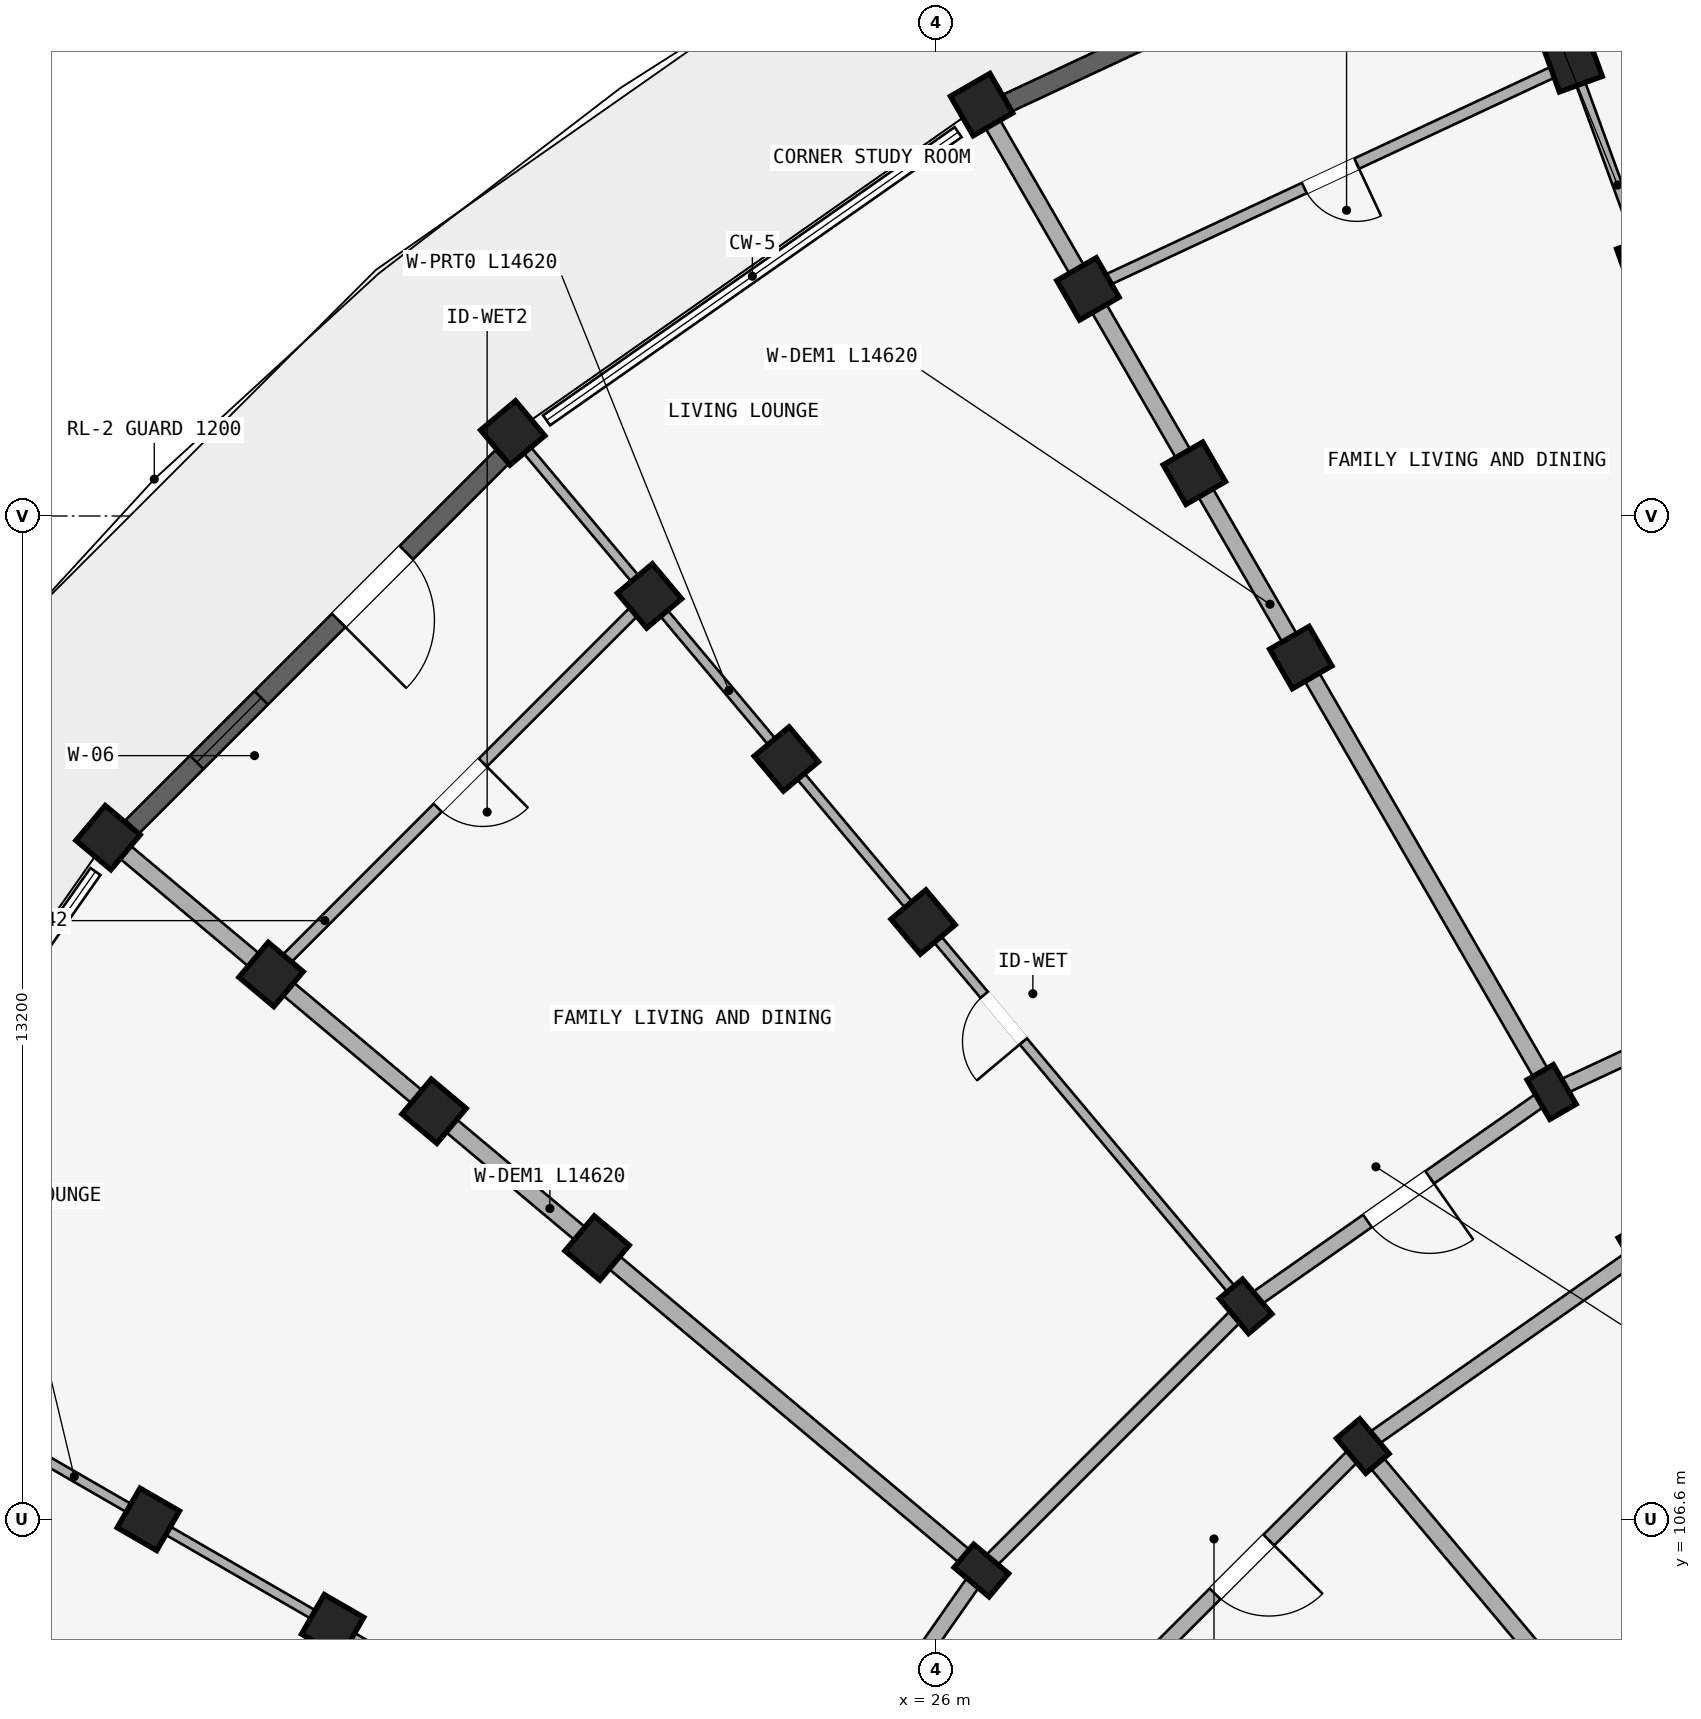
"""IFC4 building model, lengths in metres.
Left out: names, types, materials, properties, quantities, classifications, styles, units other than length and angle.
Written with IfcOpenShell. Run it as: python <this file> out.ifc"""

import sys

from ifc_helpers import new_model, si_unit, direction, frame, frame_2d, origin, origin_2d, place, context, subcontext, project, spatial, rectangle, extrude, element, fill, save


model = new_model("IFC4")
c1 = context("Model", 3, precision=1e-05, world=origin(), true_north=direction((0.0, 1.0)))
c2 = subcontext(c1, "Body", "Model", "MODEL_VIEW")
j1 = project(units=[si_unit("LENGTHUNIT", "METRE"), si_unit("PLANEANGLEUNIT", "RADIAN")], contexts=[c1])
p1 = place(None, origin())
s1 = spatial("IfcSite", under=j1, at=p1, CompositionType="ELEMENT")
p2 = place(p1, origin())
s2 = spatial("IfcBuilding", under=s1, at=p2, CompositionType="ELEMENT")
p3 = place(p2, frame((0.0, 0.0, 40.2)))
s3 = spatial("IfcBuildingStorey", under=s2, at=p3, CompositionType="ELEMENT", Elevation=40.2)
for number, where, z_axis, x_axis in (
    (1, (35.34, 123.132, 0.0), (0.0, 0.0, 1.0), (0.94, 0.342, 0.0)),
    (2, (34.382, 125.764, 0.0), (0.0, 0.0, 1.0), (0.94, 0.342, 0.0)),
):
    element("IfcColumn", number, at=place(p3, frame(where, z_axis=z_axis, x_axis=x_axis)), inside=s3, PredefinedType="COLUMN", context=c2, shape_type="SweptSolid", body=[
        extrude(rectangle(XDim=0.6, YDim=0.6, at=origin_2d()), origin(), (0.0, 0.0, 1.0), 2.93),
    ])
for number, where, z_axis, x_axis in (
    (3, (35.3, 110.144, 0.0), (0.0, 0.0, 1.0), (0.866, 0.5, 0.0)),
    (4, (34.1, 112.222, 0.0), (0.0, 0.0, 1.0), (0.866, 0.5, 0.0)),
):
    element("IfcColumn", number, at=place(p3, frame(where, z_axis=z_axis, x_axis=x_axis)), inside=s3, PredefinedType="COLUMN", context=c2, shape_type="SweptSolid", body=[
        extrude(rectangle(XDim=0.4, YDim=0.6, at=origin_2d()), origin(), (0.0, 0.0, 1.0), 2.93),
    ])
for number, where, z_axis, x_axis in (
    (5, (30.8, 117.938, 0.0), (0.0, 0.0, 1.0), (0.866, 0.5, 0.0)),
    (6, (29.4, 120.363, 0.0), (0.0, 0.0, 1.0), (0.866, 0.5, 0.0)),
    (7, (28.0, 122.787, 0.0), (0.0, 0.0, 1.0), (0.866, 0.5, 0.0)),
):
    element("IfcColumn", number, at=place(p3, frame(where, z_axis=z_axis, x_axis=x_axis)), inside=s3, PredefinedType="COLUMN", context=c2, shape_type="SweptSolid", body=[
        extrude(rectangle(XDim=0.6, YDim=0.6, at=origin_2d()), origin(), (0.0, 0.0, 1.0), 2.93),
    ])
p4 = place(p3, frame((26.6, 125.212, 0.0), z_axis=(0.0, 0.0, 1.0), x_axis=(0.866025403784, 0.5, 0.0)))
e8 = element("IfcColumn", 8, at=p4, inside=s3, PredefinedType="COLUMN", context=c2, shape_type="SweptSolid", body=[
    extrude(rectangle(XDim=0.6, YDim=0.6, at=origin_2d()), origin(), (0.0, 0.0, 1.0), 2.97),
])
for number, where, z_axis, x_axis in (
    (9, (31.616, 107.564, 0.0), (0.0, 0.0, 1.0), (0.766, 0.643, 0.0)),
    (10, (30.073, 109.402, 0.0), (0.0, 0.0, 1.0), (0.766, 0.643, 0.0)),
):
    element("IfcColumn", number, at=place(p3, frame(where, z_axis=z_axis, x_axis=x_axis)), inside=s3, PredefinedType="COLUMN", context=c2, shape_type="SweptSolid", body=[
        extrude(rectangle(XDim=0.4, YDim=0.6, at=origin_2d()), origin(), (0.0, 0.0, 1.0), 2.93),
    ])
for number, where, z_axis, x_axis in (
    (11, (25.831, 114.458, 0.0), (0.0, 0.0, 1.0), (0.766, 0.643, 0.0)),
    (12, (24.031, 116.603, 0.0), (0.0, 0.0, 1.0), (0.766, 0.643, 0.0)),
    (13, (22.231, 118.748, 0.0), (0.0, 0.0, 1.0), (0.766, 0.643, 0.0)),
):
    element("IfcColumn", number, at=place(p3, frame(where, z_axis=z_axis, x_axis=x_axis)), inside=s3, PredefinedType="COLUMN", context=c2, shape_type="SweptSolid", body=[
        extrude(rectangle(XDim=0.6, YDim=0.6, at=origin_2d()), origin(), (0.0, 0.0, 1.0), 2.93),
    ])
p5 = place(p3, frame((20.432, 120.893, 0.0), z_axis=(0.0, 0.0, 1.0), x_axis=(0.766044443119, 0.642787609687, 0.0)))
e14 = element("IfcColumn", 14, at=p5, inside=s3, PredefinedType="COLUMN", context=c2, shape_type="SweptSolid", body=[
    extrude(rectangle(XDim=0.6, YDim=0.6, at=origin_2d()), origin(), (0.0, 0.0, 1.0), 2.97),
])
p6 = place(p3, frame((26.598, 105.927, 0.0), z_axis=(0.0, 0.0, 1.0), x_axis=(0.642787609687, 0.766044443119, 0.0)))
e15 = element("IfcColumn", 15, at=p6, inside=s3, PredefinedType="COLUMN", context=c2, shape_type="SweptSolid", body=[
    extrude(rectangle(XDim=0.4, YDim=0.6, at=origin_2d()), origin(), (0.0, 0.0, 1.0), 2.93),
])
for number, where, z_axis, x_axis in (
    (16, (21.542, 110.169, 0.0), (0.0, 0.0, 1.0), (0.643, 0.766, 0.0)),
    (17, (19.397, 111.969, 0.0), (0.0, 0.0, 1.0), (0.643, 0.766, 0.0)),
    (18, (17.252, 113.769, 0.0), (0.0, 0.0, 1.0), (0.643, 0.766, 0.0)),
):
    element("IfcColumn", number, at=place(p3, frame(where, z_axis=z_axis, x_axis=x_axis)), inside=s3, PredefinedType="COLUMN", context=c2, shape_type="SweptSolid", body=[
        extrude(rectangle(XDim=0.6, YDim=0.6, at=origin_2d()), origin(), (0.0, 0.0, 1.0), 2.93),
    ])
p7 = place(p3, frame((15.107, 115.568, 0.0), z_axis=(0.0, 0.0, 1.0), x_axis=(0.642787609687, 0.766044443119, 0.0)))
e19 = element("IfcColumn", 19, at=p7, inside=s3, PredefinedType="COLUMN", context=c2, shape_type="SweptSolid", body=[
    extrude(rectangle(XDim=0.6, YDim=0.6, at=origin_2d()), origin(), (0.0, 0.0, 1.0), 2.97),
])
for number, where, z_axis, x_axis in (
    (20, (18.062, 105.2, 0.0), (0.0, 0.0, 1.0), (0.5, 0.866, 0.0)),
    (21, (15.637, 106.6, 0.0), (0.0, 0.0, 1.0), (0.5, 0.866, 0.0)),
):
    element("IfcColumn", number, at=place(p3, frame(where, z_axis=z_axis, x_axis=x_axis)), inside=s3, PredefinedType="COLUMN", context=c2, shape_type="SweptSolid", body=[
        extrude(rectangle(XDim=0.6, YDim=0.6, at=origin_2d()), origin(), (0.0, 0.0, 1.0), 2.93),
    ])
p8 = place(p3, frame((38.555, 114.299, 0.0), z_axis=(0.0, 0.0, 1.0), x_axis=(-0.906302381024, -0.422629854778, 0.0)))
e22 = element("IfcWall", 22, at=p8, inside=s3, PredefinedType="STANDARD", context=c2, shape_type="SweptSolid", body=[
    extrude(rectangle(XDim=4.915, YDim=0.2, at=frame_2d((2.458, 0.0))), origin(), (0.0, 0.0, 1.0), 2.372),
])
p9 = place(p3, frame((35.3, 110.144, 0.0), z_axis=(0.0, 0.0, 1.0), x_axis=(-0.819155404658, -0.573571637217, 0.0)))
e23 = element("IfcWall", 23, at=p9, inside=s3, PredefinedType="STANDARD", context=c2, shape_type="SweptSolid", body=[
    extrude(rectangle(XDim=4.497, YDim=0.2, at=frame_2d((2.249, 0.0))), origin(), (0.0, 0.0, 1.0), 2.372),
])
p10 = place(p3, frame((34.1, 112.222, 0.0), z_axis=(0.0, 0.0, 1.0), x_axis=(-0.819140911474, -0.573592335331, 0.0)))
e24 = element("IfcWall", 24, at=p10, inside=s3, PredefinedType="STANDARD", context=c2, shape_type="SweptSolid", body=[
    extrude(rectangle(XDim=4.916, YDim=0.2, at=frame_2d((2.458, 0.0))), origin(), (0.0, 0.0, 1.0), 2.372),
])
p11 = place(p10, frame((1.958, 0.0, 0.0)))
e25 = element("IfcOpeningElement", 25, at=p11, cuts=e24, PredefinedType="OPENING", context=c2, shape_type="SweptSolid", body=[
    extrude(rectangle(XDim=1.0, YDim=2.15, at=frame_2d((0.5, 1.075))), frame((0.0, 0.11, 0.0), z_axis=(0.0, -1.0, 0.0), x_axis=(1.0, 0.0, 0.0)), (0.0, 0.0, 1.0), 0.22),
])
p12 = place(p3, frame((31.616, 107.564, 0.0), z_axis=(0.0, 0.0, 1.0), x_axis=(-0.707106781187, -0.707106781187, 0.0)))
e26 = element("IfcWall", 26, at=p12, inside=s3, PredefinedType="STANDARD", context=c2, shape_type="SweptSolid", body=[
    extrude(rectangle(XDim=4.497, YDim=0.2, at=frame_2d((2.249, 0.0))), origin(), (0.0, 0.0, 1.0), 2.372),
])
p13 = place(p12, frame((1.749, 0.0, 0.0)))
e27 = element("IfcOpeningElement", 27, at=p13, cuts=e26, PredefinedType="OPENING", context=c2, shape_type="SweptSolid", body=[
    extrude(rectangle(XDim=1.0, YDim=2.15, at=frame_2d((0.5, 1.075))), frame((0.0, 0.11, 0.0), z_axis=(0.0, -1.0, 0.0), x_axis=(1.0, 0.0, 0.0)), (0.0, 0.0, 1.0), 0.22),
])
p14 = place(p3, frame((30.073, 109.402, 0.0), z_axis=(0.0, 0.0, 1.0), x_axis=(-0.707106781187, -0.707106781187, 0.0)))
e28 = element("IfcWall", 28, at=p14, inside=s3, PredefinedType="STANDARD", context=c2, shape_type="SweptSolid", body=[
    extrude(rectangle(XDim=4.916, YDim=0.2, at=frame_2d((2.458, 0.0))), origin(), (0.0, 0.0, 1.0), 2.372),
])
p15 = place(p3, frame((26.598, 105.927, 0.0), z_axis=(0.0, 0.0, 1.0), x_axis=(-0.573592335331, -0.819140911474, 0.0)))
e29 = element("IfcWall", 29, at=p15, inside=s3, PredefinedType="STANDARD", context=c2, shape_type="SweptSolid", body=[
    extrude(rectangle(XDim=4.916, YDim=0.2, at=frame_2d((2.458, 0.0))), origin(), (0.0, 0.0, 1.0), 2.372),
])
p16 = place(p15, frame((1.938, 0.0, 0.0)))
e30 = element("IfcOpeningElement", 30, at=p16, cuts=e29, PredefinedType="OPENING", context=c2, shape_type="SweptSolid", body=[
    extrude(rectangle(XDim=1.04, YDim=2.15, at=frame_2d((0.52, 1.075))), frame((0.0, 0.11, 0.0), z_axis=(0.0, -1.0, 0.0), x_axis=(1.0, 0.0, 0.0)), (0.0, 0.0, 1.0), 0.22),
])
p17 = place(p3, frame((38.521, 114.393, 0.0), z_axis=(0.0, 0.0, 1.0), x_axis=(-0.342015232663, 0.939694408106, 0.0)))
e31 = element("IfcWall", 31, at=p17, inside=s3, PredefinedType="PARTITIONING", context=c2, shape_type="SweptSolid", body=[
    extrude(rectangle(XDim=14.62, YDim=0.125, at=frame_2d((7.31, 0.0))), origin(), (0.0, 0.0, 1.0), 2.372),
])
p18 = place(p17, frame((4.449, 0.0, 0.0)))
e32 = element("IfcOpeningElement", 32, at=p18, cuts=e31, PredefinedType="OPENING", context=c2, shape_type="SweptSolid", body=[
    extrude(rectangle(XDim=0.8, YDim=2.1, at=frame_2d((0.4, 1.05))), frame((0.0, 0.073, 0.0), z_axis=(0.0, -1.0, 0.0), x_axis=(1.0, 0.0, 0.0)), (0.0, 0.0, 1.0), 0.145),
])
p19 = place(p3, frame((34.05, 112.309, 0.0), z_axis=(0.0, 0.0, 1.0), x_axis=(-0.500007702989, 0.866020956416, 0.0)))
e33 = element("IfcWall", 33, at=p19, inside=s3, PredefinedType="STANDARD", context=c2, shape_type="SweptSolid", body=[
    extrude(rectangle(XDim=14.62, YDim=0.22, at=frame_2d((7.31, 0.0))), origin(), (0.0, 0.0, 1.0), 2.372),
])
p20 = place(p3, frame((35.987, 102.355, 0.0), z_axis=(0.0, 0.0, 1.0), x_axis=(-0.642784846501, 0.766046761698, 0.0)))
e34 = element("IfcWall", 34, at=p20, inside=s3, PredefinedType="STANDARD", context=c2, shape_type="SweptSolid", body=[
    extrude(rectangle(XDim=6.75, YDim=0.22, at=frame_2d((3.375, 0.0))), origin(), (0.0, 0.0, 1.0), 2.372),
])
p21 = place(p3, frame((30.009, 109.479, 0.0), z_axis=(0.0, 0.0, 1.0), x_axis=(-0.642779216656, 0.76605148563, 0.0)))
e35 = element("IfcWall", 35, at=p21, inside=s3, PredefinedType="PARTITIONING", context=c2, shape_type="SweptSolid", body=[
    extrude(rectangle(XDim=14.62, YDim=0.125, at=frame_2d((7.31, 0.0))), origin(), (0.0, 0.0, 1.0), 2.372),
])
p22 = place(p21, frame((4.449, 0.0, 0.0)))
e36 = element("IfcOpeningElement", 36, at=p22, cuts=e35, PredefinedType="OPENING", context=c2, shape_type="SweptSolid", body=[
    extrude(rectangle(XDim=0.8, YDim=2.1, at=frame_2d((0.4, 1.05))), frame((0.0, 0.073, 0.0), z_axis=(0.0, -1.0, 0.0), x_axis=(1.0, 0.0, 0.0)), (0.0, 0.0, 1.0), 0.145),
])
p23 = place(p3, frame((26.521, 105.991, 0.0), z_axis=(0.0, 0.0, 1.0), x_axis=(-0.76605148563, 0.642779216656, 0.0)))
e37 = element("IfcWall", 37, at=p23, inside=s3, PredefinedType="STANDARD", context=c2, shape_type="SweptSolid", body=[
    extrude(rectangle(XDim=14.62, YDim=0.22, at=frame_2d((7.31, 0.0))), origin(), (0.0, 0.0, 1.0), 2.372),
])
p24 = place(p3, frame((23.691, 101.95, 0.0), z_axis=(0.0, 0.0, 1.0), x_axis=(-0.866020956416, 0.500007702989, 0.0)))
e38 = element("IfcWall", 38, at=p24, inside=s3, PredefinedType="PARTITIONING", context=c2, shape_type="SweptSolid", body=[
    extrude(rectangle(XDim=14.62, YDim=0.125, at=frame_2d((7.31, 0.0))), origin(), (0.0, 0.0, 1.0), 2.372),
])
p25 = place(p24, frame((4.449, 0.0, 0.0)))
e39 = element("IfcOpeningElement", 39, at=p25, cuts=e38, PredefinedType="OPENING", context=c2, shape_type="SweptSolid", body=[
    extrude(rectangle(XDim=0.8, YDim=2.1, at=frame_2d((0.4, 1.05))), frame((0.0, 0.073, 0.0), z_axis=(0.0, -1.0, 0.0), x_axis=(1.0, 0.0, 0.0)), (0.0, 0.0, 1.0), 0.145),
])
p26 = place(p3, frame((34.382, 125.764, 0.0), z_axis=(0.0, 0.0, 1.0), x_axis=(-0.906297360311, -0.422640621205, 0.0)))
e40 = element("IfcWall", 40, at=p26, inside=s3, PredefinedType="PLUMBINGWALL", context=c2, shape_type="SweptSolid", body=[
    extrude(rectangle(XDim=7.042, YDim=0.15, at=frame_2d((3.521, 0.0))), origin(), (0.0, 0.0, 1.0), 2.372),
])
p27 = place(p26, frame((3.141, 0.0, 0.0)))
e41 = element("IfcOpeningElement", 41, at=p27, cuts=e40, PredefinedType="OPENING", context=c2, shape_type="SweptSolid", body=[
    extrude(rectangle(XDim=0.76, YDim=2.05, at=frame_2d((0.38, 1.025))), frame((0.0, 0.085, 0.0), z_axis=(0.0, -1.0, 0.0), x_axis=(1.0, 0.0, 0.0)), (0.0, 0.0, 1.0), 0.17),
])
p28 = place(p3, frame((22.231, 118.748, 0.0), z_axis=(0.0, 0.0, 1.0), x_axis=(-0.707106781187, -0.707106781187, 0.0)))
e42 = element("IfcWall", 42, at=p28, inside=s3, PredefinedType="PLUMBINGWALL", context=c2, shape_type="SweptSolid", body=[
    extrude(rectangle(XDim=7.042, YDim=0.15, at=frame_2d((3.521, 0.0))), origin(), (0.0, 0.0, 1.0), 2.372),
])
p29 = place(p28, frame((3.101, 0.0, 0.0)))
e43 = element("IfcOpeningElement", 43, at=p29, cuts=e42, PredefinedType="OPENING", context=c2, shape_type="SweptSolid", body=[
    extrude(rectangle(XDim=0.84, YDim=2.1, at=frame_2d((0.42, 1.05))), frame((0.0, 0.085, 0.0), z_axis=(0.0, -1.0, 0.0), x_axis=(1.0, 0.0, 0.0)), (0.0, 0.0, 1.0), 0.17),
])
p30 = place(p3, frame((33.182, 128.144, 0.0), z_axis=(0.0, 0.0, 1.0), x_axis=(-0.906302789289, -0.422628979279, 0.0)))
e44 = element("IfcWall", 44, at=p30, inside=s3, PredefinedType="STANDARD", context=c2, shape_type="SweptSolid", body=[
    extrude(rectangle(XDim=6.879, YDim=0.25, at=frame_2d((3.439, 0.0))), origin(), (0.0, 0.0, 1.0), 2.48),
])
p31 = place(p30, frame((2.54, 0.0, 0.63)))
e45 = element("IfcOpeningElement", 45, at=p31, cuts=e44, PredefinedType="OPENING", context=c2, shape_type="SweptSolid", body=[
    extrude(rectangle(XDim=1.8, YDim=1.65, at=frame_2d((0.9, 0.825))), frame((0.0, 0.135, 0.0), z_axis=(0.0, -1.0, 0.0), x_axis=(1.0, 0.0, 0.0)), (0.0, 0.0, 1.0), 0.27),
])
p32 = place(p3, frame((20.29, 120.574, 0.0), z_axis=(0.0, 0.0, 1.0), x_axis=(-0.707106781187, -0.707106781187, 0.0)))
e46 = element("IfcWall", 46, at=p32, inside=s3, PredefinedType="STANDARD", context=c2, shape_type="SweptSolid", body=[
    extrude(rectangle(XDim=6.879, YDim=0.25, at=frame_2d((3.439, 0.0))), origin(), (0.0, 0.0, 1.0), 2.48),
])
p33 = place(p32, frame((4.479, 0.0, 0.53)))
e47 = element("IfcOpeningElement", 47, at=p33, cuts=e46, PredefinedType="OPENING", context=c2, shape_type="SweptSolid", body=[
    extrude(rectangle(XDim=1.2, YDim=1.5, at=frame_2d((0.6, 0.75))), frame((0.0, 0.135, 0.0), z_axis=(0.0, -1.0, 0.0), x_axis=(1.0, 0.0, 0.0)), (0.0, 0.0, 1.0), 0.27),
])
p34 = place(p32, frame((1.778, 0.0, 0.0)))
e48 = element("IfcOpeningElement", 48, at=p34, cuts=e46, PredefinedType="OPENING", context=c2, shape_type="SweptSolid", body=[
    extrude(rectangle(XDim=1.26, YDim=2.15, at=frame_2d((0.63, 1.075))), frame((0.0, 0.135, 0.0), z_axis=(0.0, -1.0, 0.0), x_axis=(1.0, 0.0, 0.0)), (0.0, 0.0, 1.0), 0.27),
])
p35 = place(p33, origin())
e49 = element("IfcWindow", 49, at=p35, inside=s3, PartitioningType="SINGLE_PANEL", PredefinedType="WINDOW", context=c2, shape_type="SweptSolid", body=[
    extrude(rectangle(XDim=1.2, YDim=1.5, at=frame_2d((0.6, 0.75))), frame((0.0, 0.03, 0.0), z_axis=(0.0, -1.0, 0.0), x_axis=(1.0, 0.0, 0.0)), (0.0, 0.0, 1.0), 0.06),
])
fill(e47, e49)
p36 = place(p22, origin())
e50 = element("IfcDoor", 50, at=p36, inside=s3, OperationType="SINGLE_SWING_LEFT", PredefinedType="DOOR", context=c2, shape_type="SweptSolid", body=[
    extrude(rectangle(XDim=0.8, YDim=2.1, at=frame_2d((0.4, 1.05))), frame((0.0, 0.025, 0.0), z_axis=(0.0, -1.0, 0.0), x_axis=(1.0, 0.0, 0.0)), (0.0, 0.0, 1.0), 0.05),
])
fill(e36, e50)
p37 = place(p27, frame((0.76, 0.0, 0.0), z_axis=(0.0, 0.0, 1.0), x_axis=(-1.0, 0.0, 0.0)))
e51 = element("IfcDoor", 51, at=p37, inside=s3, OperationType="SINGLE_SWING_RIGHT", PredefinedType="DOOR", context=c2, shape_type="SweptSolid", body=[
    extrude(rectangle(XDim=0.76, YDim=2.05, at=frame_2d((0.38, 1.025))), frame((0.0, 0.025, 0.0), z_axis=(0.0, -1.0, 0.0), x_axis=(1.0, 0.0, 0.0)), (0.0, 0.0, 1.0), 0.05),
])
fill(e41, e51)
p38 = place(p11, origin())
e52 = element("IfcDoor", 52, at=p38, inside=s3, OperationType="SINGLE_SWING_LEFT", PredefinedType="DOOR", context=c2, shape_type="SweptSolid", body=[
    extrude(rectangle(XDim=1.0, YDim=2.15, at=frame_2d((0.5, 1.075))), frame((0.0, 0.025, 0.0), z_axis=(0.0, -1.0, 0.0), x_axis=(1.0, 0.0, 0.0)), (0.0, 0.0, 1.0), 0.05),
])
fill(e25, e52)
p39 = place(p29, frame((0.84, 0.0, 0.0), z_axis=(0.0, 0.0, 1.0), x_axis=(-1.0, 0.0, 0.0)))
e53 = element("IfcDoor", 53, at=p39, inside=s3, OperationType="SINGLE_SWING_RIGHT", PredefinedType="DOOR", context=c2, shape_type="SweptSolid", body=[
    extrude(rectangle(XDim=0.84, YDim=2.1, at=frame_2d((0.42, 1.05))), frame((0.0, 0.025, 0.0), z_axis=(0.0, -1.0, 0.0), x_axis=(1.0, 0.0, 0.0)), (0.0, 0.0, 1.0), 0.05),
])
fill(e43, e53)
p40 = place(p13, origin())
e54 = element("IfcDoor", 54, at=p40, inside=s3, OperationType="SINGLE_SWING_LEFT", PredefinedType="DOOR", context=c2, shape_type="SweptSolid", body=[
    extrude(rectangle(XDim=1.0, YDim=2.15, at=frame_2d((0.5, 1.075))), frame((0.0, 0.025, 0.0), z_axis=(0.0, -1.0, 0.0), x_axis=(1.0, 0.0, 0.0)), (0.0, 0.0, 1.0), 0.05),
])
fill(e27, e54)
p41 = place(p34, frame((1.26, 0.0, 0.0), z_axis=(0.0, 0.0, 1.0), x_axis=(-1.0, 0.0, 0.0)))
e55 = element("IfcDoor", 55, at=p41, inside=s3, OperationType="SINGLE_SWING_LEFT", PredefinedType="DOOR", context=c2, shape_type="SweptSolid", body=[
    extrude(rectangle(XDim=1.26, YDim=2.15, at=frame_2d((0.63, 1.075))), frame((0.0, 0.025, 0.0), z_axis=(0.0, -1.0, 0.0), x_axis=(1.0, 0.0, 0.0)), (0.0, 0.0, 1.0), 0.05),
])
fill(e48, e55)
save(model, sys.argv[1])
